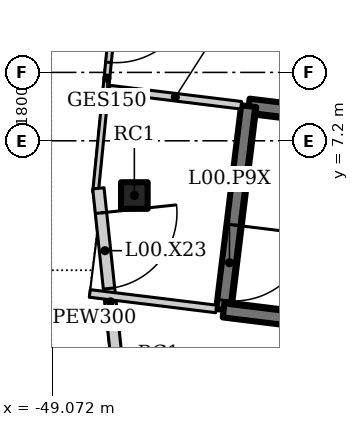
"""IFC4 building model, lengths in metres.
Left out: names, types, materials, properties, quantities, classifications, styles, units other than length and angle.
Written with IfcOpenShell. Run it as: python <this file> out.ifc"""

import sys

from ifc_helpers import new_model, si_unit, direction, frame, frame_2d, origin, origin_2d, place, context, subcontext, project, spatial, rectangle, hollow_rectangle, extrude, element, fill, save


model = new_model("IFC4")
c1 = context("Model", 3, precision=1e-05, world=origin(), true_north=direction((0.0, 1.0)))
c2 = subcontext(c1, "Body", "Model", "MODEL_VIEW")
j1 = project(units=[si_unit("LENGTHUNIT", "METRE"), si_unit("PLANEANGLEUNIT", "RADIAN")], contexts=[c1])
p1 = place(None, origin())
s1 = spatial("IfcSite", under=j1, at=p1, CompositionType="ELEMENT")
p2 = place(p1, origin())
s2 = spatial("IfcBuilding", under=s1, at=p2, CompositionType="ELEMENT")
p3 = place(p2, origin())
s3 = spatial("IfcBuildingStorey", under=s2, at=p3, CompositionType="ELEMENT", Elevation=0.0)
p4 = place(p3, frame((-46.908, 5.76, 0.0), z_axis=(0.0, 0.0, 1.0), x_axis=(1.0, 0.0, 0.0)))
e1 = element("IfcColumn", 1, at=p4, inside=s3, PredefinedType="COLUMN", context=c2, shape_type="SweptSolid", body=[
    extrude(hollow_rectangle(XDim=0.7, YDim=0.7, WallThickness=0.04, at=origin_2d()), origin(), (0.0, 0.0, 1.0), 6.5),
])
p5 = place(p3, frame((-47.331, 11.853, 0.0), z_axis=(0.0, 0.0, 1.0), x_axis=(-0.099051198898, -0.9950823383, 0.0)))
e2 = element("IfcWall", 2, at=p5, inside=s3, PredefinedType="ELEMENTEDWALL", context=c2, shape_type="SweptSolid", body=[
    extrude(rectangle(XDim=6.036, YDim=0.15, at=frame_2d((3.018, 0.0))), origin(), (0.0, 0.0, 1.0), 6.3),
])
p6 = place(p5, frame((0.6, 0.0, 0.0)))
e3 = element("IfcOpeningElement", 3, at=p6, cuts=e2, PredefinedType="OPENING", context=c2, shape_type="SweptSolid", body=[
    extrude(rectangle(XDim=2.0, YDim=2.4, at=frame_2d((1.0, 1.2))), frame((0.0, 0.085, 0.0), z_axis=(0.0, -1.0, 0.0), x_axis=(1.0, 0.0, 0.0)), (0.0, 0.0, 1.0), 0.17),
])
p7 = place(p3, frame((-47.855, 5.949, 0.0), z_axis=(0.0, 0.0, 1.0), x_axis=(0.105835648981, -0.99438363593, 0.0)))
e4 = element("IfcWall", 4, at=p7, inside=s3, PredefinedType="SOLIDWALL", context=c2, shape_type="SweptSolid", body=[
    extrude(rectangle(XDim=6.007, YDim=0.3, at=frame_2d((3.003, 0.0))), origin(), (0.0, 0.0, 1.0), 6.3),
])
p8 = place(p7, frame((0.65, 0.0, 0.0)))
e5 = element("IfcOpeningElement", 5, at=p8, cuts=e4, PredefinedType="OPENING", context=c2, shape_type="SweptSolid", body=[
    extrude(rectangle(XDim=2.0, YDim=2.1, at=frame_2d((1.0, 1.05))), frame((0.0, 0.16, 0.0), z_axis=(0.0, -1.0, 0.0), x_axis=(1.0, 0.0, 0.0)), (0.0, 0.0, 1.0), 0.32),
])
p9 = place(p3, frame((-44.098, 8.135, 0.0), z_axis=(0.0, 0.0, 1.0), x_axis=(-0.992546571341, 0.121865925179, 0.0)))
e6 = element("IfcWall", 6, at=p9, inside=s3, PredefinedType="SOLIDWALL", context=c2, shape_type="SweptSolid", body=[
    extrude(rectangle(XDim=3.492, YDim=0.2, at=frame_2d((1.746, 0.0))), origin(), (0.0, 0.0, 1.0), 6.3),
])
p10 = place(p3, frame((-44.756, 2.775, 0.0), z_axis=(0.0, 0.0, 1.0), x_axis=(-0.992549022568, 0.121845959305, 0.0)))
e7 = element("IfcWall", 7, at=p10, inside=s3, PredefinedType="SOLIDWALL", context=c2, shape_type="SweptSolid", body=[
    extrude(rectangle(XDim=3.35, YDim=0.2, at=frame_2d((1.675, 0.0))), origin(), (0.0, 0.0, 1.0), 6.3),
])
p11 = place(p3, frame((-35.165, 7.038, 0.0), z_axis=(0.0, 0.0, 1.0), x_axis=(-0.992545280606, 0.121876437212, 0.0)))
e8 = element("IfcWall", 8, at=p11, inside=s3, PredefinedType="SHEAR", context=c2, shape_type="SweptSolid", body=[
    extrude(rectangle(XDim=8.8, YDim=0.4, at=frame_2d((4.4, 0.0))), origin(), (0.0, 0.0, 1.0), 6.5),
])
p12 = place(p3, frame((-43.899, 8.11, 0.0), z_axis=(0.0, 0.0, 1.0), x_axis=(-0.12184754212, -0.99254882826, 0.0)))
e9 = element("IfcWall", 9, at=p12, inside=s3, PredefinedType="SHEAR", context=c2, shape_type="SweptSolid", body=[
    extrude(rectangle(XDim=5.4, YDim=0.4, at=frame_2d((2.7, 0.0))), origin(), (0.0, 0.0, 1.0), 6.5),
])
p13 = place(p12, frame((3.15, 0.0, 0.0)))
e10 = element("IfcOpeningElement", 10, at=p13, cuts=e9, PredefinedType="OPENING", context=c2, shape_type="SweptSolid", body=[
    extrude(rectangle(XDim=2.0, YDim=2.1, at=frame_2d((1.0, 1.05))), frame((0.0, 0.21, 0.0), z_axis=(0.0, -1.0, 0.0), x_axis=(1.0, 0.0, 0.0)), (0.0, 0.0, 1.0), 0.42),
])
p14 = place(p3, frame((-44.557, 2.751, 0.0), z_axis=(0.0, 0.0, 1.0), x_axis=(0.992545280606, -0.121876437212, 0.0)))
e11 = element("IfcWall", 11, at=p14, inside=s3, PredefinedType="SHEAR", context=c2, shape_type="SweptSolid", body=[
    extrude(rectangle(XDim=8.8, YDim=0.4, at=frame_2d((4.4, 0.0))), origin(), (0.0, 0.0, 1.0), 6.5),
])
p15 = place(p6, origin())
e12 = element("IfcDoor", 12, at=p15, inside=s3, OperationType="DOUBLE_DOOR_DOUBLE_SWING", PredefinedType="DOOR", context=c2, shape_type="SweptSolid", body=[
    extrude(rectangle(XDim=2.0, YDim=2.4, at=frame_2d((1.0, 1.2))), frame((0.0, 0.025, 0.0), z_axis=(0.0, -1.0, 0.0), x_axis=(1.0, 0.0, 0.0)), (0.0, 0.0, 1.0), 0.05),
])
fill(e3, e12)
p16 = place(p8, origin())
e13 = element("IfcDoor", 13, at=p16, inside=s3, OperationType="DOUBLE_DOOR_DOUBLE_SWING", PredefinedType="DOOR", context=c2, shape_type="SweptSolid", body=[
    extrude(rectangle(XDim=2.0, YDim=2.1, at=frame_2d((1.0, 1.05))), frame((0.0, 0.025, 0.0), z_axis=(0.0, -1.0, 0.0), x_axis=(1.0, 0.0, 0.0)), (0.0, 0.0, 1.0), 0.05),
])
fill(e5, e13)
p17 = place(p13, origin())
e14 = element("IfcDoor", 14, at=p17, inside=s3, OperationType="DOUBLE_DOOR_DOUBLE_SWING", PredefinedType="DOOR", context=c2, shape_type="SweptSolid", body=[
    extrude(rectangle(XDim=2.0, YDim=2.1, at=frame_2d((1.0, 1.05))), frame((0.0, 0.025, 0.0), z_axis=(0.0, -1.0, 0.0), x_axis=(1.0, 0.0, 0.0)), (0.0, 0.0, 1.0), 0.05),
])
fill(e10, e14)
save(model, sys.argv[1])
